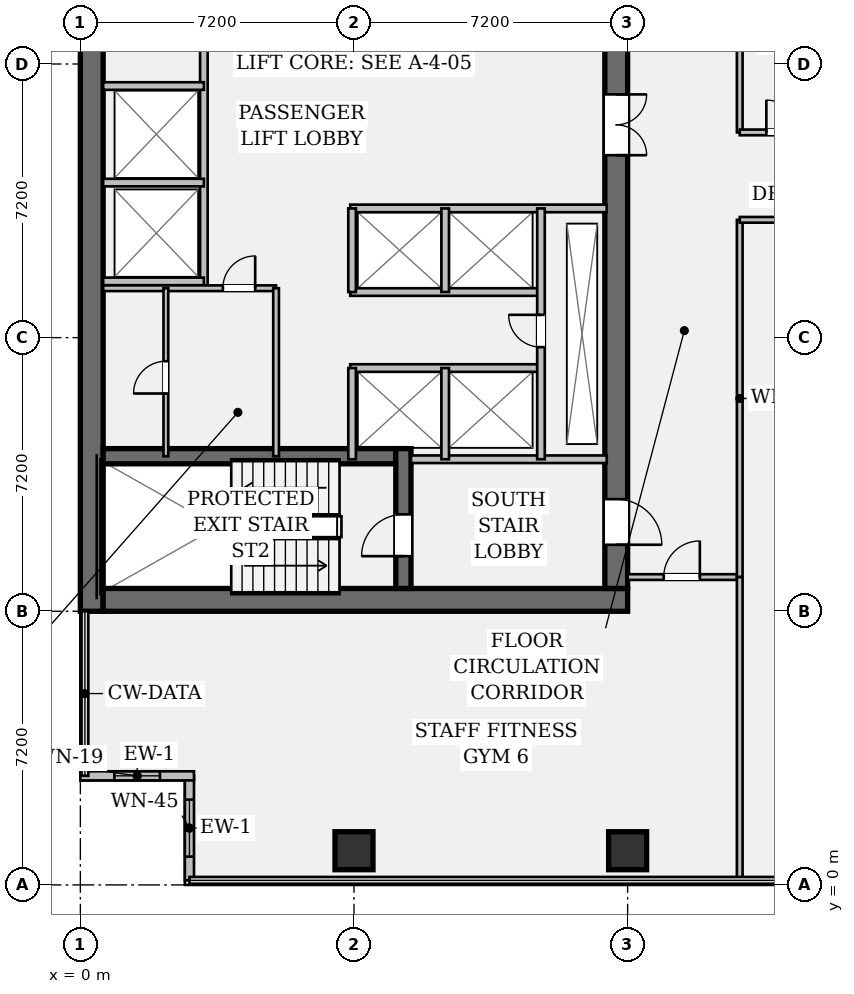
"""IFC4 building model, lengths in metres.
Left out: names, types, materials, properties, quantities, classifications, styles, units other than length and angle.
Written with IfcOpenShell. Run it as: python <this file> out.ifc"""

import sys

from ifc_helpers import new_model, si_unit, direction, frame, frame_2d, origin, origin_2d, place, context, subcontext, project, spatial, rectangle, hollow_rectangle, extrude, element, fill, save


model = new_model("IFC4")
c1 = context("Model", 3, precision=1e-05, world=origin(), true_north=direction((0.0, 1.0)))
c2 = subcontext(c1, "Body", "Model", "MODEL_VIEW")
j1 = project(units=[si_unit("LENGTHUNIT", "METRE"), si_unit("PLANEANGLEUNIT", "RADIAN")], contexts=[c1])
p1 = place(None, origin())
s1 = spatial("IfcSite", under=j1, at=p1, CompositionType="ELEMENT")
p2 = place(p1, origin())
s2 = spatial("IfcBuilding", under=s1, at=p2, CompositionType="ELEMENT")
p3 = place(p2, frame((0.0, 0.0, 73.5)))
s3 = spatial("IfcBuildingStorey", under=s2, at=p3, CompositionType="ELEMENT", Elevation=73.5)
p4 = place(p3, frame((0.3, 7.2, 0.0), z_axis=(0.0, 0.0, 1.0), x_axis=(0.0, 1.0, 0.0)))
e1 = element("IfcWall", 1, at=p4, inside=s3, PredefinedType="SHEAR", context=c2, shape_type="SweptSolid", body=[
    extrude(rectangle(XDim=28.8, YDim=0.6, at=frame_2d((14.4, 0.0))), origin(), (0.0, 0.0, 1.0), 3.57),
])
p5 = place(p3, frame((0.6, 7.5, 0.0), z_axis=(0.0, 0.0, 1.0), x_axis=(1.0, 0.0, 0.0)))
e2 = element("IfcWall", 2, at=p5, inside=s3, PredefinedType="SHEAR", context=c2, shape_type="SweptSolid", body=[
    extrude(rectangle(XDim=13.8, YDim=0.6, at=frame_2d((6.9, 0.0))), origin(), (0.0, 0.0, 1.0), 3.57),
])
p6 = place(p3, frame((14.1, 35.4, 0.0), z_axis=(0.0, 0.0, 1.0), x_axis=(0.0, -1.0, 0.0)))
e3 = element("IfcWall", 3, at=p6, inside=s3, PredefinedType="SHEAR", context=c2, shape_type="SweptSolid", body=[
    extrude(rectangle(XDim=27.6, YDim=0.6, at=frame_2d((13.8, 0.0))), origin(), (0.0, 0.0, 1.0), 3.57),
])
p7 = place(p6, frame((1.3, 0.0, 0.0)))
e4 = element("IfcOpeningElement", 4, at=p7, cuts=e3, PredefinedType="OPENING", context=c2, shape_type="SweptSolid", body=[
    extrude(rectangle(XDim=1.2, YDim=2.15, at=frame_2d((0.6, 1.075))), frame((0.0, 0.312, 0.0), z_axis=(0.0, -1.0, 0.0), x_axis=(1.0, 0.0, 0.0)), (0.0, 0.0, 1.0), 0.624),
])
p8 = place(p6, frame((25.25, 0.0, 0.0)))
e5 = element("IfcOpeningElement", 5, at=p8, cuts=e3, PredefinedType="OPENING", context=c2, shape_type="SweptSolid", body=[
    extrude(rectangle(XDim=1.2, YDim=2.15, at=frame_2d((0.6, 1.075))), frame((0.0, 0.312, 0.0), z_axis=(0.0, -1.0, 0.0), x_axis=(1.0, 0.0, 0.0)), (0.0, 0.0, 1.0), 0.624),
])
p9 = place(p6, frame((14.6, 0.0, 0.0)))
e6 = element("IfcOpeningElement", 6, at=p9, cuts=e3, PredefinedType="OPENING", context=c2, shape_type="SweptSolid", body=[
    extrude(rectangle(XDim=1.6, YDim=2.2, at=frame_2d((0.8, 1.1))), frame((0.0, 0.312, 0.0), z_axis=(0.0, -1.0, 0.0), x_axis=(1.0, 0.0, 0.0)), (0.0, 0.0, 1.0), 0.624),
])
p10 = place(p3, frame((0.6, 11.28, 0.0), z_axis=(0.0, 0.0, 1.0), x_axis=(1.0, 0.0, 0.0)))
e7 = element("IfcWall", 7, at=p10, inside=s3, PredefinedType="SHEAR", context=c2, shape_type="SweptSolid", body=[
    extrude(rectangle(XDim=7.7, YDim=0.4, at=frame_2d((3.85, 0.0))), origin(), (0.0, 0.0, 1.0), 3.57),
])
p11 = place(p3, frame((8.5, 7.8, 0.0), z_axis=(0.0, 0.0, 1.0), x_axis=(0.0, 1.0, 0.0)))
e8 = element("IfcWall", 8, at=p11, inside=s3, PredefinedType="SHEAR", context=c2, shape_type="SweptSolid", body=[
    extrude(rectangle(XDim=3.68, YDim=0.4, at=frame_2d((1.84, 0.0))), origin(), (0.0, 0.0, 1.0), 3.57),
])
p12 = place(p11, frame((0.85, 0.0, 0.0)))
e9 = element("IfcOpeningElement", 9, at=p12, cuts=e8, PredefinedType="OPENING", context=c2, shape_type="SweptSolid", body=[
    extrude(rectangle(XDim=1.1, YDim=2.15, at=frame_2d((0.55, 1.075))), frame((0.0, 0.212, 0.0), z_axis=(0.0, -1.0, 0.0), x_axis=(1.0, 0.0, 0.0)), (0.0, 0.0, 1.0), 0.424),
])
for number, where, z_axis, x_axis in (
    (10, (7.2, 0.9, 0.0), (0.0, 0.0, 1.0), (1.0, 0.0, 0.0)),
    (11, (14.4, 0.9, 0.0), (0.0, 0.0, 1.0), (1.0, 0.0, 0.0)),
):
    element("IfcColumn", number, at=place(p3, frame(where, z_axis=z_axis, x_axis=x_axis)), inside=s3, PredefinedType="COLUMN", context=c2, shape_type="SweptSolid", body=[
        extrude(hollow_rectangle(XDim=1.0, YDim=1.0, WallThickness=0.065, at=origin_2d()), origin(), (0.0, 0.0, 1.0), 3.57),
    ])
p13 = place(p3, frame((2.87, 0.12, 0.0), z_axis=(0.0, 0.0, 1.0), x_axis=(0.0, 1.0, 0.0)))
e12 = element("IfcWall", 12, at=p13, inside=s3, PredefinedType="STANDARD", context=c2, shape_type="SweptSolid", body=[
    extrude(rectangle(XDim=2.75, YDim=0.24, at=frame_2d((1.375, 0.0))), origin(), (0.0, 0.0, 1.0), 3.57),
])
p14 = place(p13, frame((0.625, 0.0, 0.95)))
e13 = element("IfcOpeningElement", 13, at=p14, cuts=e12, PredefinedType="OPENING", context=c2, shape_type="SweptSolid", body=[
    extrude(rectangle(XDim=1.5, YDim=1.8, at=frame_2d((0.75, 0.9))), frame((0.0, 0.132, 0.0), z_axis=(0.0, -1.0, 0.0), x_axis=(1.0, 0.0, 0.0)), (0.0, 0.0, 1.0), 0.264),
])
p15 = place(p3, frame((2.99, 2.87, 0.0), z_axis=(0.0, 0.0, 1.0), x_axis=(-1.0, 0.0, 0.0)))
e14 = element("IfcWall", 14, at=p15, inside=s3, PredefinedType="STANDARD", context=c2, shape_type="SweptSolid", body=[
    extrude(rectangle(XDim=2.99, YDim=0.24, at=frame_2d((1.495, 0.0))), origin(), (0.0, 0.0, 1.0), 3.57),
])
p16 = place(p15, frame((0.895, 0.0, 0.95)))
e15 = element("IfcOpeningElement", 15, at=p16, cuts=e14, PredefinedType="OPENING", context=c2, shape_type="SweptSolid", body=[
    extrude(rectangle(XDim=1.2, YDim=1.8, at=frame_2d((0.6, 0.9))), frame((0.0, 0.132, 0.0), z_axis=(0.0, -1.0, 0.0), x_axis=(1.0, 0.0, 0.0)), (0.0, 0.0, 1.0), 0.264),
])
p17 = place(p3, frame((8.7, 11.2, 0.0), z_axis=(0.0, 0.0, 1.0), x_axis=(1.0, 0.0, 0.0)))
e16 = element("IfcWall", 16, at=p17, inside=s3, PredefinedType="PARTITIONING", context=c2, shape_type="SweptSolid", body=[
    extrude(rectangle(XDim=5.15, YDim=0.2, at=frame_2d((2.575, 0.0))), origin(), (0.0, 0.0, 1.0), 3.57),
])
p18 = place(p3, frame((3.25, 15.7, 0.0), z_axis=(0.0, 0.0, 1.0), x_axis=(0.0, 1.0, 0.0)))
e17 = element("IfcWall", 17, at=p18, inside=s3, PredefinedType="PARTITIONING", context=c2, shape_type="SweptSolid", body=[
    extrude(rectangle(XDim=13.08, YDim=0.2, at=frame_2d((6.54, 0.0))), origin(), (0.0, 0.0, 1.0), 3.57),
])
for number, where, z_axis, x_axis in (
    (18, (0.6, 15.88, 0.0), (0.0, 0.0, 1.0), (1.0, 0.0, 0.0)),
    (19, (0.6, 18.48, 0.0), (0.0, 0.0, 1.0), (1.0, 0.0, 0.0)),
    (20, (0.6, 21.02, 0.0), (0.0, 0.0, 1.0), (1.0, 0.0, 0.0)),
):
    element("IfcWall", number, at=place(p3, frame(where, z_axis=z_axis, x_axis=x_axis)), inside=s3, PredefinedType="PARTITIONING", context=c2, shape_type="SweptSolid", body=[
        extrude(rectangle(XDim=2.65, YDim=0.2, at=frame_2d((1.325, 0.0))), origin(), (0.0, 0.0, 1.0), 3.57),
    ])
p19 = place(p3, frame((7.1, 17.8, 0.0), z_axis=(0.0, 0.0, 1.0), x_axis=(1.0, 0.0, 0.0)))
e21 = element("IfcWall", 21, at=p19, inside=s3, PredefinedType="PARTITIONING", context=c2, shape_type="SweptSolid", body=[
    extrude(rectangle(XDim=6.75, YDim=0.2, at=frame_2d((3.375, 0.0))), origin(), (0.0, 0.0, 1.0), 3.57),
])
for number, where, z_axis, x_axis in (
    (22, (7.1, 15.6, 0.0), (0.0, 0.0, 1.0), (1.0, 0.0, 0.0)),
    (23, (7.1, 13.6, 0.0), (0.0, 0.0, 1.0), (1.0, 0.0, 0.0)),
):
    element("IfcWall", number, at=place(p3, frame(where, z_axis=z_axis, x_axis=x_axis)), inside=s3, PredefinedType="PARTITIONING", context=c2, shape_type="SweptSolid", body=[
        extrude(rectangle(XDim=5.02, YDim=0.2, at=frame_2d((2.51, 0.0))), origin(), (0.0, 0.0, 1.0), 3.57),
    ])
p20 = place(p3, frame((7.15, 15.6, 0.0), z_axis=(0.0, 0.0, 1.0), x_axis=(0.0, 1.0, 0.0)))
e24 = element("IfcWall", 24, at=p20, inside=s3, PredefinedType="PARTITIONING", context=c2, shape_type="SweptSolid", body=[
    extrude(rectangle(XDim=2.2, YDim=0.2, at=frame_2d((1.1, 0.0))), origin(), (0.0, 0.0, 1.0), 3.57),
])
p21 = place(p3, frame((7.15, 11.2, 0.0), z_axis=(0.0, 0.0, 1.0), x_axis=(0.0, 1.0, 0.0)))
e25 = element("IfcWall", 25, at=p21, inside=s3, PredefinedType="PARTITIONING", context=c2, shape_type="SweptSolid", body=[
    extrude(rectangle(XDim=2.4, YDim=0.2, at=frame_2d((1.2, 0.0))), origin(), (0.0, 0.0, 1.0), 3.57),
])
p22 = place(p3, frame((9.6, 15.6, 0.0), z_axis=(0.0, 0.0, 1.0), x_axis=(0.0, 1.0, 0.0)))
e26 = element("IfcWall", 26, at=p22, inside=s3, PredefinedType="PARTITIONING", context=c2, shape_type="SweptSolid", body=[
    extrude(rectangle(XDim=2.2, YDim=0.2, at=frame_2d((1.1, 0.0))), origin(), (0.0, 0.0, 1.0), 3.57),
])
p23 = place(p3, frame((9.6, 11.2, 0.0), z_axis=(0.0, 0.0, 1.0), x_axis=(0.0, 1.0, 0.0)))
e27 = element("IfcWall", 27, at=p23, inside=s3, PredefinedType="PARTITIONING", context=c2, shape_type="SweptSolid", body=[
    extrude(rectangle(XDim=2.4, YDim=0.2, at=frame_2d((1.2, 0.0))), origin(), (0.0, 0.0, 1.0), 3.57),
])
p24 = place(p3, frame((12.12, 11.2, 0.0), z_axis=(0.0, 0.0, 1.0), x_axis=(0.0, 1.0, 0.0)))
e28 = element("IfcWall", 28, at=p24, inside=s3, PredefinedType="PARTITIONING", context=c2, shape_type="SweptSolid", body=[
    extrude(rectangle(XDim=6.6, YDim=0.2, at=frame_2d((3.3, 0.0))), origin(), (0.0, 0.0, 1.0), 3.57),
])
p25 = place(p24, frame((2.95, 0.0, 0.0)))
e29 = element("IfcOpeningElement", 29, at=p25, cuts=e28, PredefinedType="OPENING", context=c2, shape_type="SweptSolid", body=[
    extrude(rectangle(XDim=0.85, YDim=2.15, at=frame_2d((0.425, 1.075))), frame((0.0, 0.112, 0.0), z_axis=(0.0, -1.0, 0.0), x_axis=(1.0, 0.0, 0.0)), (0.0, 0.0, 1.0), 0.224),
])
p26 = place(p3, frame((0.6, 15.7, 0.0), z_axis=(0.0, 0.0, 1.0), x_axis=(1.0, 0.0, 0.0)))
e30 = element("IfcWall", 30, at=p26, inside=s3, PredefinedType="PARTITIONING", context=c2, shape_type="SweptSolid", body=[
    extrude(rectangle(XDim=4.55, YDim=0.15, at=frame_2d((2.275, 0.0))), origin(), (0.0, 0.0, 1.0), 3.57),
])
p27 = place(p26, frame((3.15, 0.0, 0.0)))
e31 = element("IfcOpeningElement", 31, at=p27, cuts=e30, PredefinedType="OPENING", context=c2, shape_type="SweptSolid", body=[
    extrude(rectangle(XDim=0.85, YDim=2.15, at=frame_2d((0.425, 1.075))), frame((0.0, 0.087, 0.0), z_axis=(0.0, -1.0, 0.0), x_axis=(1.0, 0.0, 0.0)), (0.0, 0.0, 1.0), 0.174),
])
p28 = place(p3, frame((5.15, 11.28, 0.0), z_axis=(0.0, 0.0, 1.0), x_axis=(0.0, 1.0, 0.0)))
e32 = element("IfcWall", 32, at=p28, inside=s3, PredefinedType="PARTITIONING", context=c2, shape_type="SweptSolid", body=[
    extrude(rectangle(XDim=4.42, YDim=0.15, at=frame_2d((2.21, 0.0))), origin(), (0.0, 0.0, 1.0), 3.57),
])
p29 = place(p3, frame((2.25, 11.28, 0.0), z_axis=(0.0, 0.0, 1.0), x_axis=(0.0, 1.0, 0.0)))
e33 = element("IfcWall", 33, at=p29, inside=s3, PredefinedType="PARTITIONING", context=c2, shape_type="SweptSolid", body=[
    extrude(rectangle(XDim=4.42, YDim=0.125, at=frame_2d((2.21, 0.0))), origin(), (0.0, 0.0, 1.0), 3.57),
])
p30 = place(p29, frame((1.65, 0.0, 0.0)))
e34 = element("IfcOpeningElement", 34, at=p30, cuts=e33, PredefinedType="OPENING", context=c2, shape_type="SweptSolid", body=[
    extrude(rectangle(XDim=0.85, YDim=2.15, at=frame_2d((0.425, 1.075))), frame((0.0, 0.074, 0.0), z_axis=(0.0, -1.0, 0.0), x_axis=(1.0, 0.0, 0.0)), (0.0, 0.0, 1.0), 0.149),
])
p31 = place(p3, frame((14.4, 8.1, 0.0), z_axis=(0.0, 0.0, 1.0), x_axis=(1.0, 0.0, 0.0)))
e35 = element("IfcWall", 35, at=p31, inside=s3, PredefinedType="PARTITIONING", context=c2, shape_type="SweptSolid", body=[
    extrude(rectangle(XDim=2.95, YDim=0.15, at=frame_2d((1.475, 0.0))), origin(), (0.0, 0.0, 1.0), 3.088),
])
p32 = place(p31, frame((0.95, 0.0, 0.0)))
e36 = element("IfcOpeningElement", 36, at=p32, cuts=e35, PredefinedType="OPENING", context=c2, shape_type="SweptSolid", body=[
    extrude(rectangle(XDim=0.95, YDim=2.15, at=frame_2d((0.475, 1.075))), frame((0.0, 0.087, 0.0), z_axis=(0.0, -1.0, 0.0), x_axis=(1.0, 0.0, 0.0)), (0.0, 0.0, 1.0), 0.174),
])
p33 = place(p3, frame((17.35, 8.1, 0.0), z_axis=(0.0, 0.0, 1.0), x_axis=(0.0, 1.0, 0.0)))
e37 = element("IfcWall", 37, at=p33, inside=s3, PredefinedType="PARTITIONING", context=c2, shape_type="SweptSolid", body=[
    extrude(rectangle(XDim=9.4, YDim=0.15, at=frame_2d((4.7, 0.0))), origin(), (0.0, 0.0, 1.0), 2.783),
])
p34 = place(p3, frame((17.35, 19.8, 0.0), z_axis=(0.0, 0.0, 1.0), x_axis=(0.0, 1.0, 0.0)))
e38 = element("IfcWall", 38, at=p34, inside=s3, PredefinedType="PARTITIONING", context=c2, shape_type="SweptSolid", body=[
    extrude(rectangle(XDim=16.1, YDim=0.15, at=frame_2d((8.05, 0.0))), origin(), (0.0, 0.0, 1.0), 2.783),
])
p35 = place(p34, frame((4.3, 0.0, 0.0)))
e39 = element("IfcOpeningElement", 39, at=p35, cuts=e38, PredefinedType="OPENING", context=c2, shape_type="SweptSolid", body=[
    extrude(rectangle(XDim=0.95, YDim=2.15, at=frame_2d((0.475, 1.075))), frame((0.0, 0.087, 0.0), z_axis=(0.0, -1.0, 0.0), x_axis=(1.0, 0.0, 0.0)), (0.0, 0.0, 1.0), 0.174),
])
p36 = place(p34, frame((8.0, 0.0, 0.0)))
e40 = element("IfcOpeningElement", 40, at=p36, cuts=e38, PredefinedType="OPENING", context=c2, shape_type="SweptSolid", body=[
    extrude(rectangle(XDim=0.95, YDim=2.15, at=frame_2d((0.475, 1.075))), frame((0.0, 0.087, 0.0), z_axis=(0.0, -1.0, 0.0), x_axis=(1.0, 0.0, 0.0)), (0.0, 0.0, 1.0), 0.174),
])
p37 = place(p34, frame((12.5, 0.0, 0.0)))
e41 = element("IfcOpeningElement", 41, at=p37, cuts=e38, PredefinedType="OPENING", context=c2, shape_type="SweptSolid", body=[
    extrude(rectangle(XDim=0.95, YDim=2.15, at=frame_2d((0.475, 1.075))), frame((0.0, 0.087, 0.0), z_axis=(0.0, -1.0, 0.0), x_axis=(1.0, 0.0, 0.0)), (0.0, 0.0, 1.0), 0.174),
])
p38 = place(p3, frame((17.35, 17.5, 0.0), z_axis=(0.0, 0.0, 1.0), x_axis=(1.0, 0.0, 0.0)))
e42 = element("IfcWall", 42, at=p38, inside=s3, PredefinedType="PARTITIONING", context=c2, shape_type="SweptSolid", body=[
    extrude(rectangle(XDim=21.85, YDim=0.15, at=frame_2d((10.925, 0.0))), origin(), (0.0, 0.0, 1.0), 2.783),
])
p39 = place(p38, frame((4.02, 0.0, 0.0)))
e43 = element("IfcOpeningElement", 43, at=p39, cuts=e42, PredefinedType="OPENING", context=c2, shape_type="SweptSolid", body=[
    extrude(rectangle(XDim=0.95, YDim=2.15, at=frame_2d((0.475, 1.075))), frame((0.0, 0.087, 0.0), z_axis=(0.0, -1.0, 0.0), x_axis=(1.0, 0.0, 0.0)), (0.0, 0.0, 1.0), 0.174),
])
p40 = place(p38, frame((12.45, 0.0, 0.0)))
e44 = element("IfcOpeningElement", 44, at=p40, cuts=e42, PredefinedType="OPENING", context=c2, shape_type="SweptSolid", body=[
    extrude(rectangle(XDim=0.95, YDim=2.15, at=frame_2d((0.475, 1.075))), frame((0.0, 0.087, 0.0), z_axis=(0.0, -1.0, 0.0), x_axis=(1.0, 0.0, 0.0)), (0.0, 0.0, 1.0), 0.174),
])
p41 = place(p38, frame((18.85, 0.0, 0.0)))
e45 = element("IfcOpeningElement", 45, at=p41, cuts=e42, PredefinedType="OPENING", context=c2, shape_type="SweptSolid", body=[
    extrude(rectangle(XDim=0.95, YDim=2.15, at=frame_2d((0.475, 1.075))), frame((0.0, 0.087, 0.0), z_axis=(0.0, -1.0, 0.0), x_axis=(1.0, 0.0, 0.0)), (0.0, 0.0, 1.0), 0.174),
])
p42 = place(p3, frame((17.35, 19.8, 0.0), z_axis=(0.0, 0.0, 1.0), x_axis=(1.0, 0.0, 0.0)))
e46 = element("IfcWall", 46, at=p42, inside=s3, PredefinedType="PARTITIONING", context=c2, shape_type="SweptSolid", body=[
    extrude(rectangle(XDim=21.85, YDim=0.15, at=frame_2d((10.925, 0.0))), origin(), (0.0, 0.0, 1.0), 2.783),
])
p43 = place(p42, frame((0.7, 0.0, 0.0)))
e47 = element("IfcOpeningElement", 47, at=p43, cuts=e46, PredefinedType="OPENING", context=c2, shape_type="SweptSolid", body=[
    extrude(rectangle(XDim=0.85, YDim=2.15, at=frame_2d((0.425, 1.075))), frame((0.0, 0.087, 0.0), z_axis=(0.0, -1.0, 0.0), x_axis=(1.0, 0.0, 0.0)), (0.0, 0.0, 1.0), 0.174),
])
p44 = place(p42, frame((3.95, 0.0, 0.0)))
e48 = element("IfcOpeningElement", 48, at=p44, cuts=e46, PredefinedType="OPENING", context=c2, shape_type="SweptSolid", body=[
    extrude(rectangle(XDim=0.85, YDim=2.15, at=frame_2d((0.425, 1.075))), frame((0.0, 0.087, 0.0), z_axis=(0.0, -1.0, 0.0), x_axis=(1.0, 0.0, 0.0)), (0.0, 0.0, 1.0), 0.174),
])
p45 = place(p42, frame((6.46, 0.0, 0.0)))
e49 = element("IfcOpeningElement", 49, at=p45, cuts=e46, PredefinedType="OPENING", context=c2, shape_type="SweptSolid", body=[
    extrude(rectangle(XDim=0.85, YDim=2.15, at=frame_2d((0.425, 1.075))), frame((0.0, 0.087, 0.0), z_axis=(0.0, -1.0, 0.0), x_axis=(1.0, 0.0, 0.0)), (0.0, 0.0, 1.0), 0.174),
])
p46 = place(p42, frame((9.5, 0.0, 0.0)))
e50 = element("IfcOpeningElement", 50, at=p46, cuts=e46, PredefinedType="OPENING", context=c2, shape_type="SweptSolid", body=[
    extrude(rectangle(XDim=0.95, YDim=2.15, at=frame_2d((0.475, 1.075))), frame((0.0, 0.087, 0.0), z_axis=(0.0, -1.0, 0.0), x_axis=(1.0, 0.0, 0.0)), (0.0, 0.0, 1.0), 0.174),
])
p47 = place(p3, frame((17.35, 0.12, 0.0), z_axis=(0.0, 0.0, 1.0), x_axis=(0.0, 1.0, 0.0)))
e51 = element("IfcWall", 51, at=p47, inside=s3, PredefinedType="PARTITIONING", context=c2, shape_type="SweptSolid", body=[
    extrude(rectangle(XDim=7.98, YDim=0.15, at=frame_2d((3.99, 0.0))), origin(), (0.0, 0.0, 1.0), 2.783),
])
p48 = place(p14, origin())
e52 = element("IfcWindow", 52, at=p48, inside=s3, PartitioningType="SINGLE_PANEL", PredefinedType="WINDOW", context=c2, shape_type="SweptSolid", body=[
    extrude(rectangle(XDim=1.5, YDim=1.8, at=frame_2d((0.75, 0.9))), frame((0.0, 0.03, 0.0), z_axis=(0.0, -1.0, 0.0), x_axis=(1.0, 0.0, 0.0)), (0.0, 0.0, 1.0), 0.06),
])
fill(e13, e52)
p49 = place(p16, origin())
e53 = element("IfcWindow", 53, at=p49, inside=s3, PartitioningType="SINGLE_PANEL", PredefinedType="WINDOW", context=c2, shape_type="SweptSolid", body=[
    extrude(rectangle(XDim=1.2, YDim=1.8, at=frame_2d((0.6, 0.9))), frame((0.0, 0.03, 0.0), z_axis=(0.0, -1.0, 0.0), x_axis=(1.0, 0.0, 0.0)), (0.0, 0.0, 1.0), 0.06),
])
fill(e15, e53)
p50 = place(p12, origin())
e54 = element("IfcDoor", 54, at=p50, inside=s3, OperationType="SINGLE_SWING_LEFT", PredefinedType="DOOR", context=c2, shape_type="SweptSolid", body=[
    extrude(rectangle(XDim=1.1, YDim=2.15, at=frame_2d((0.55, 1.075))), frame((0.0, 0.025, 0.0), z_axis=(0.0, -1.0, 0.0), x_axis=(1.0, 0.0, 0.0)), (0.0, 0.0, 1.0), 0.05),
])
fill(e9, e54)
p51 = place(p8, origin())
e55 = element("IfcDoor", 55, at=p51, inside=s3, OperationType="SINGLE_SWING_RIGHT", PredefinedType="DOOR", context=c2, shape_type="SweptSolid", body=[
    extrude(rectangle(XDim=1.2, YDim=2.15, at=frame_2d((0.6, 1.075))), frame((0.0, 0.025, 0.0), z_axis=(0.0, -1.0, 0.0), x_axis=(1.0, 0.0, 0.0)), (0.0, 0.0, 1.0), 0.05),
])
fill(e5, e55)
p52 = place(p9, origin())
e56 = element("IfcDoor", 56, at=p52, inside=s3, OperationType="DOUBLE_DOOR_SINGLE_SWING", PredefinedType="DOOR", context=c2, shape_type="SweptSolid", body=[
    extrude(rectangle(XDim=1.6, YDim=2.2, at=frame_2d((0.8, 1.1))), frame((0.0, 0.025, 0.0), z_axis=(0.0, -1.0, 0.0), x_axis=(1.0, 0.0, 0.0)), (0.0, 0.0, 1.0), 0.05),
])
fill(e6, e56)
p53 = place(p25, origin())
e57 = element("IfcDoor", 57, at=p53, inside=s3, OperationType="SINGLE_SWING_RIGHT", PredefinedType="DOOR", context=c2, shape_type="SweptSolid", body=[
    extrude(rectangle(XDim=0.85, YDim=2.15, at=frame_2d((0.425, 1.075))), frame((0.0, 0.025, 0.0), z_axis=(0.0, -1.0, 0.0), x_axis=(1.0, 0.0, 0.0)), (0.0, 0.0, 1.0), 0.05),
])
fill(e29, e57)
p54 = place(p27, origin())
e58 = element("IfcDoor", 58, at=p54, inside=s3, OperationType="SINGLE_SWING_RIGHT", PredefinedType="DOOR", context=c2, shape_type="SweptSolid", body=[
    extrude(rectangle(XDim=0.85, YDim=2.15, at=frame_2d((0.425, 1.075))), frame((0.0, 0.025, 0.0), z_axis=(0.0, -1.0, 0.0), x_axis=(1.0, 0.0, 0.0)), (0.0, 0.0, 1.0), 0.05),
])
fill(e31, e58)
p55 = place(p30, origin())
e59 = element("IfcDoor", 59, at=p55, inside=s3, OperationType="SINGLE_SWING_LEFT", PredefinedType="DOOR", context=c2, shape_type="SweptSolid", body=[
    extrude(rectangle(XDim=0.85, YDim=2.15, at=frame_2d((0.425, 1.075))), frame((0.0, 0.025, 0.0), z_axis=(0.0, -1.0, 0.0), x_axis=(1.0, 0.0, 0.0)), (0.0, 0.0, 1.0), 0.05),
])
fill(e34, e59)
p56 = place(p43, origin())
e60 = element("IfcDoor", 60, at=p56, inside=s3, OperationType="SINGLE_SWING_LEFT", PredefinedType="DOOR", context=c2, shape_type="SweptSolid", body=[
    extrude(rectangle(XDim=0.85, YDim=2.15, at=frame_2d((0.425, 1.075))), frame((0.0, 0.025, 0.0), z_axis=(0.0, -1.0, 0.0), x_axis=(1.0, 0.0, 0.0)), (0.0, 0.0, 1.0), 0.05),
])
fill(e47, e60)
p57 = place(p32, origin())
e61 = element("IfcDoor", 61, at=p57, inside=s3, OperationType="SINGLE_SWING_RIGHT", PredefinedType="DOOR", context=c2, shape_type="SweptSolid", body=[
    extrude(rectangle(XDim=0.95, YDim=2.15, at=frame_2d((0.475, 1.075))), frame((0.0, 0.025, 0.0), z_axis=(0.0, -1.0, 0.0), x_axis=(1.0, 0.0, 0.0)), (0.0, 0.0, 1.0), 0.05),
])
fill(e36, e61)
save(model, sys.argv[1])
